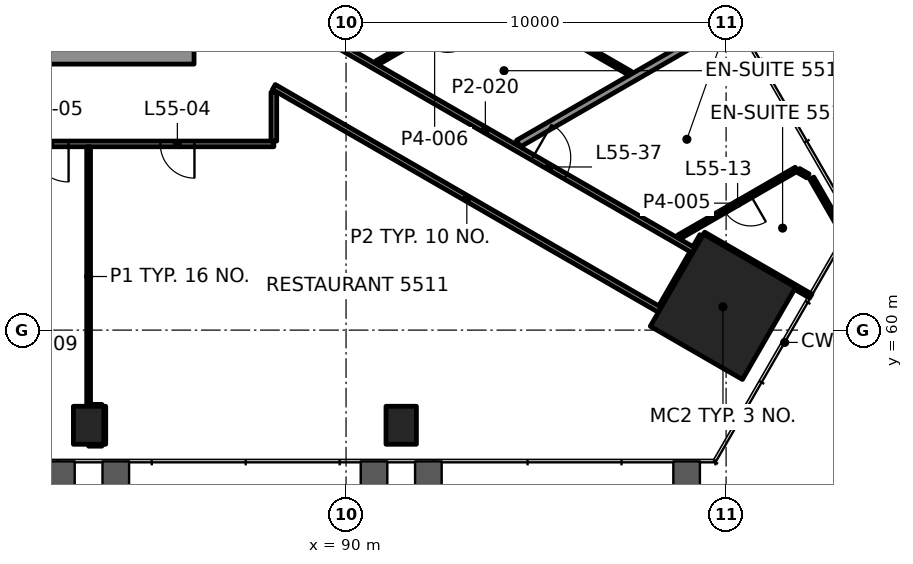
"""IFC4 building model, lengths in metres.
Left out: names, types, materials, properties, quantities, classifications, styles, units other than length and angle.
Written with IfcOpenShell. Run it as: python <this file> out.ifc"""

import sys

from ifc_helpers import new_model, si_unit, direction, frame, frame_2d, origin, origin_2d, place, context, subcontext, project, spatial, rectangle, hollow_rectangle, extrude, element, fill, save


model = new_model("IFC4")
c1 = context("Model", 3, precision=1e-05, world=origin(), true_north=direction((0.0, 1.0)))
c2 = subcontext(c1, "Body", "Model", "MODEL_VIEW")
j1 = project(units=[si_unit("LENGTHUNIT", "METRE"), si_unit("PLANEANGLEUNIT", "RADIAN")], contexts=[c1])
p1 = place(None, origin())
s1 = spatial("IfcSite", under=j1, at=p1, CompositionType="ELEMENT")
p2 = place(p1, origin())
s2 = spatial("IfcBuilding", under=s1, at=p2, CompositionType="ELEMENT")
p3 = place(p2, frame((0.0, 0.0, 233.8)))
s3 = spatial("IfcBuildingStorey", under=s2, at=p3, CompositionType="ELEMENT", Elevation=233.8)
p4 = place(p3, frame((99.918, 60.614, 0.0), z_axis=(0.0, 0.0, 1.0), x_axis=(0.5, 0.866025403784, 0.0)))
e1 = element("IfcColumn", 1, at=p4, inside=s3, PredefinedType="COLUMN", context=c2, shape_type="SweptSolid", body=[
    extrude(rectangle(XDim=2.8, YDim=2.8, at=origin_2d()), origin(), (0.0, 0.0, 1.0), 3.9),
])
for number, where, z_axis, x_axis in (
    (2, (83.226, 57.496, -0.0), (0.0, 0.0, 1.0), (1.0, 0.0, 0.0)),
    (3, (91.451, 57.496, -0.0), (0.0, 0.0, 1.0), (1.0, 0.0, 0.0)),
):
    element("IfcColumn", number, at=place(p3, frame(where, z_axis=z_axis, x_axis=x_axis)), inside=s3, PredefinedType="COLUMN", context=c2, shape_type="SweptSolid", body=[
        extrude(hollow_rectangle(XDim=0.8, YDim=1.0, WallThickness=0.05, at=origin_2d()), origin(), (0.0, 0.0, 1.0), 3.9),
    ])
p5 = place(p3, frame((64.0, 67.375, 0.0), z_axis=(0.0, 0.0, 1.0), x_axis=(1.0, 0.0, 0.0)))
e4 = element("IfcWall", 4, at=p5, inside=s3, PredefinedType="SHEAR", context=c2, shape_type="SweptSolid", body=[
    extrude(rectangle(XDim=22.0, YDim=0.75, at=frame_2d((11.0, 0.0))), origin(), (0.0, 0.0, 1.0), 3.7),
])
p6 = place(p5, frame((1.575, 0.0, 0.0)))
e5 = element("IfcOpeningElement", 5, at=p6, cuts=e4, PredefinedType="OPENING", context=c2, shape_type="SweptSolid", body=[
    extrude(rectangle(XDim=0.9, YDim=2.1, at=frame_2d((0.45, 1.05))), frame((0.0, 0.385, 0.0), z_axis=(0.0, -1.0, 0.0), x_axis=(1.0, 0.0, 0.0)), (0.0, 0.0, 1.0), 0.77),
])
p7 = place(p5, frame((4.425, 0.0, 0.0)))
e6 = element("IfcOpeningElement", 6, at=p7, cuts=e4, PredefinedType="OPENING", context=c2, shape_type="SweptSolid", body=[
    extrude(rectangle(XDim=0.9, YDim=2.1, at=frame_2d((0.45, 1.05))), frame((0.0, 0.385, 0.0), z_axis=(0.0, -1.0, 0.0), x_axis=(1.0, 0.0, 0.0)), (0.0, 0.0, 1.0), 0.77),
])
p8 = place(p3, frame((83.226, 56.996, 0.0), z_axis=(0.0, 0.0, 1.0), x_axis=(1.0, 0.0, 0.0)))
e7 = element("IfcWall", 7, at=p8, inside=s3, PredefinedType="PARTITIONING", context=c2, shape_type="SweptSolid", body=[
    extrude(rectangle(XDim=0.349, YDim=0.1, at=frame_2d((0.175, 0.0))), origin(), (0.0, 0.0, 1.0), 3.1),
])
p9 = place(p3, frame((83.286, 57.996, 0.0), z_axis=(0.0, 0.0, 1.0), x_axis=(1.0, 0.0, 0.0)))
e8 = element("IfcWall", 8, at=p9, inside=s3, PredefinedType="PARTITIONING", context=c2, shape_type="SweptSolid", body=[
    extrude(rectangle(XDim=0.289, YDim=0.1, at=frame_2d((0.145, 0.0))), origin(), (0.0, 0.0, 1.0), 3.1),
])
p10 = place(p3, frame((88.099, 64.9, 0.0), z_axis=(0.0, 0.0, 1.0), x_axis=(-1.0, 0.0, 0.0)))
e9 = element("IfcWall", 9, at=p10, inside=s3, PredefinedType="PARTITIONING", context=c2, shape_type="SweptSolid", body=[
    extrude(rectangle(XDim=26.199, YDim=0.15, at=frame_2d((13.1, 0.0))), origin(), (0.0, 0.0, 1.0), 3.1),
])
p11 = place(p10, frame((2.088, 0.0, 0.0)))
e10 = element("IfcOpeningElement", 10, at=p11, cuts=e9, PredefinedType="OPENING", context=c2, shape_type="SweptSolid", body=[
    extrude(rectangle(XDim=0.9, YDim=2.1, at=frame_2d((0.45, 1.05))), frame((0.0, 0.085, 0.0), z_axis=(0.0, -1.0, 0.0), x_axis=(1.0, 0.0, 0.0)), (0.0, 0.0, 1.0), 0.17),
])
p12 = place(p10, frame((5.4, 0.0, 0.0)))
e11 = element("IfcOpeningElement", 11, at=p12, cuts=e9, PredefinedType="OPENING", context=c2, shape_type="SweptSolid", body=[
    extrude(rectangle(XDim=1.0, YDim=2.1, at=frame_2d((0.5, 1.05))), frame((0.0, 0.085, 0.0), z_axis=(0.0, -1.0, 0.0), x_axis=(1.0, 0.0, 0.0)), (0.0, 0.0, 1.0), 0.17),
])
p13 = place(p10, frame((17.946, 0.0, 0.0)))
e12 = element("IfcOpeningElement", 12, at=p13, cuts=e9, PredefinedType="OPENING", context=c2, shape_type="SweptSolid", body=[
    extrude(rectangle(XDim=1.0, YDim=2.1, at=frame_2d((0.5, 1.05))), frame((0.0, 0.085, 0.0), z_axis=(0.0, -1.0, 0.0), x_axis=(1.0, 0.0, 0.0)), (0.0, 0.0, 1.0), 0.17),
])
p14 = place(p10, frame((24.395, 0.0, 0.0)))
e13 = element("IfcOpeningElement", 13, at=p14, cuts=e9, PredefinedType="OPENING", context=c2, shape_type="SweptSolid", body=[
    extrude(rectangle(XDim=1.0, YDim=2.1, at=frame_2d((0.5, 1.05))), frame((0.0, 0.085, 0.0), z_axis=(0.0, -1.0, 0.0), x_axis=(1.0, 0.0, 0.0)), (0.0, 0.0, 1.0), 0.17),
])
p15 = place(p3, frame((101.848, 64.234, 0.0), z_axis=(0.0, 0.0, 1.0), x_axis=(-0.865998731726, -0.500046194516, 0.0)))
e14 = element("IfcWall", 14, at=p15, inside=s3, PredefinedType="PARTITIONING", context=c2, shape_type="SweptSolid", body=[
    extrude(rectangle(XDim=3.569, YDim=0.12, at=frame_2d((1.784, 0.0))), origin(), (0.0, 0.0, 1.0), 3.1),
])
p16 = place(p15, frame((1.384, 0.0, 0.0)))
e15 = element("IfcOpeningElement", 15, at=p16, cuts=e14, PredefinedType="OPENING", context=c2, shape_type="SweptSolid", body=[
    extrude(rectangle(XDim=0.8, YDim=2.1, at=frame_2d((0.4, 1.05))), frame((0.0, 0.07, 0.0), z_axis=(0.0, -1.0, 0.0), x_axis=(1.0, 0.0, 0.0)), (0.0, 0.0, 1.0), 0.14),
])
p17 = place(p3, frame((94.535, 64.907, 0.0), z_axis=(0.0, 0.0, 1.0), x_axis=(0.866024015056, 0.50000240534, 0.0)))
e16 = element("IfcWall", 16, at=p17, inside=s3, PredefinedType="PARTITIONING", context=c2, shape_type="SweptSolid", body=[
    extrude(rectangle(XDim=6.593, YDim=0.2, at=frame_2d((3.296, 0.0))), origin(), (0.0, 0.0, 1.0), 3.1),
])
p18 = place(p3, frame((93.846, 68.784, 0.0), z_axis=(0.0, 0.0, 1.0), x_axis=(-0.865997352085, -0.500048583822, 0.0)))
e17 = element("IfcWall", 17, at=p18, inside=s3, PredefinedType="PARTITIONING", context=c2, shape_type="SweptSolid", body=[
    extrude(rectangle(XDim=3.499, YDim=0.12, at=frame_2d((1.75, 0.0))), origin(), (0.0, 0.0, 1.0), 3.1),
])
p19 = place(p18, frame((1.35, 0.0, 0.0)))
e18 = element("IfcOpeningElement", 18, at=p19, cuts=e17, PredefinedType="OPENING", context=c2, shape_type="SweptSolid", body=[
    extrude(rectangle(XDim=0.8, YDim=2.1, at=frame_2d((0.4, 1.05))), frame((0.0, 0.07, 0.0), z_axis=(0.0, -1.0, 0.0), x_axis=(1.0, 0.0, 0.0)), (0.0, 0.0, 1.0), 0.14),
])
p20 = place(p3, frame((98.293, 60.6, 0.0), z_axis=(0.0, 0.0, 1.0), x_axis=(0.499927431592, 0.866067297121, 0.0)))
e19 = element("IfcWall", 19, at=p20, inside=s3, PredefinedType="PARTITIONING", context=c2, shape_type="SweptSolid", body=[
    extrude(rectangle(XDim=1.65, YDim=0.15, at=frame_2d((0.825, 0.0))), origin(), (0.0, 0.0, 1.0), 2.947),
])
p21 = place(p3, frame((88.1, 64.976, 0.0), z_axis=(0.0, 0.0, 1.0), x_axis=(0.0, 1.0, 0.0)))
e20 = element("IfcWall", 20, at=p21, inside=s3, PredefinedType="PARTITIONING", context=c2, shape_type="SweptSolid", body=[
    extrude(rectangle(XDim=1.285, YDim=0.15, at=frame_2d((0.643, 0.0))), origin(), (0.0, 0.0, 1.0), 2.947),
])
p22 = place(p3, frame((83.626, 56.997, 0.0), z_axis=(0.0, 0.0, 1.0), x_axis=(0.0, 1.0, 0.0)))
e21 = element("IfcWall", 21, at=p22, inside=s3, PredefinedType="PARTITIONING", context=c2, shape_type="SweptSolid", body=[
    extrude(rectangle(XDim=0.999, YDim=0.1, at=frame_2d((0.5, 0.0))), origin(), (0.0, 0.0, 1.0), 3.022),
])
p23 = place(p3, frame((83.226, 57.996, 0.0), z_axis=(0.0, 0.0, 1.0), x_axis=(0.0, 1.0, 0.0)))
e22 = element("IfcWall", 22, at=p23, inside=s3, PredefinedType="PARTITIONING", context=c2, shape_type="SweptSolid", body=[
    extrude(rectangle(XDim=6.829, YDim=0.1, at=frame_2d((3.415, 0.0))), origin(), (0.0, 0.0, 1.0), 3.1),
])
p24 = place(p3, frame((103.138, 62.471, 0.0), z_axis=(0.0, 0.0, 1.0), x_axis=(-0.499998282143, 0.866026395587, 0.0)))
e23 = element("IfcWall", 23, at=p24, inside=s3, PredefinedType="PARTITIONING", context=c2, shape_type="SweptSolid", body=[
    extrude(rectangle(XDim=1.762, YDim=0.12, at=frame_2d((0.881, 0.0))), origin(), (0.0, 0.0, 1.0), 3.1),
])
p25 = place(p3, frame((102.153, 64.058, 0.0), z_axis=(0.0, 0.0, 1.0), x_axis=(-0.866113839764, 0.499846793097, 0.0)))
e24 = element("IfcWall", 24, at=p25, inside=s3, PredefinedType="PARTITIONING", context=c2, shape_type="SweptSolid", body=[
    extrude(rectangle(XDim=0.283, YDim=0.12, at=frame_2d((0.142, 0.0))), origin(), (0.0, 0.0, 1.0), 3.1),
])
p26 = place(p3, frame((97.473, 66.76, 0.0), z_axis=(0.0, 0.0, 1.0), x_axis=(-0.866027647951, 0.499996112969, 0.0)))
e25 = element("IfcWall", 25, at=p26, inside=s3, PredefinedType="PARTITIONING", context=c2, shape_type="SweptSolid", body=[
    extrude(rectangle(XDim=4.119, YDim=0.12, at=frame_2d((2.059, 0.0))), origin(), (0.0, 0.0, 1.0), 3.1),
])
p27 = place(p3, frame((102.229, 60.896, 0.0), z_axis=(0.0, 0.0, 1.0), x_axis=(-0.866054628924, 0.499949377157, 0.0)))
e26 = element("IfcWall", 26, at=p27, inside=s3, PredefinedType="PARTITIONING", context=c2, shape_type="SweptSolid", body=[
    extrude(rectangle(XDim=3.26, YDim=0.12, at=frame_2d((1.63, 0.0))), origin(), (0.0, 0.0, 1.0), 3.1),
])
p28 = place(p3, frame((88.175, 68.433, 0.0), z_axis=(0.0, 0.0, 1.0), x_axis=(0.866028141608, -0.499995257921, 0.0)))
e27 = element("IfcWall", 27, at=p28, inside=s3, PredefinedType="PARTITIONING", context=c2, shape_type="SweptSolid", body=[
    extrude(rectangle(XDim=12.679, YDim=0.15, at=frame_2d((6.339, 0.0))), origin(), (0.0, 0.0, 1.0), 3.1),
])
p29 = place(p28, frame((7.779, 0.0, 0.0)))
e28 = element("IfcOpeningElement", 28, at=p29, cuts=e27, PredefinedType="OPENING", context=c2, shape_type="SweptSolid", body=[
    extrude(rectangle(XDim=1.0, YDim=2.1, at=frame_2d((0.5, 1.05))), frame((0.0, 0.085, 0.0), z_axis=(0.0, -1.0, 0.0), x_axis=(1.0, 0.0, 0.0)), (0.0, 0.0, 1.0), 0.17),
])
p30 = place(p3, frame((98.255, 60.535, 0.0), z_axis=(0.0, 0.0, 1.0), x_axis=(-0.866028172479, 0.49999520445, 0.0)))
e29 = element("IfcWall", 29, at=p30, inside=s3, PredefinedType="PARTITIONING", context=c2, shape_type="SweptSolid", body=[
    extrude(rectangle(XDim=11.726, YDim=0.15, at=frame_2d((5.863, 0.0))), origin(), (0.0, 0.0, 1.0), 2.947),
])
p31 = place(p3, frame((99.192, 62.158, 0.0), z_axis=(0.0, 0.0, 1.0), x_axis=(0.500534336868, 0.865716684381, 0.0)))
e30 = element("IfcWall", 30, at=p31, inside=s3, PredefinedType="PARTITIONING", context=c2, shape_type="SweptSolid", body=[
    extrude(rectangle(XDim=0.364, YDim=0.15, at=frame_2d((0.182, 0.0))), origin(), (0.0, 0.0, 1.0), 3.1),
])
p32 = place(p11, origin())
e31 = element("IfcDoor", 31, at=p32, inside=s3, OperationType="SINGLE_SWING_LEFT", PredefinedType="DOOR", context=c2, shape_type="SweptSolid", body=[
    extrude(rectangle(XDim=0.9, YDim=2.1, at=frame_2d((0.45, 1.05))), frame((0.0, 0.025, 0.0), z_axis=(0.0, -1.0, 0.0), x_axis=(1.0, 0.0, 0.0)), (0.0, 0.0, 1.0), 0.05),
])
fill(e10, e31)
p33 = place(p12, origin())
e32 = element("IfcDoor", 32, at=p33, inside=s3, OperationType="SINGLE_SWING_LEFT", PredefinedType="DOOR", context=c2, shape_type="SweptSolid", body=[
    extrude(rectangle(XDim=1.0, YDim=2.1, at=frame_2d((0.5, 1.05))), frame((0.0, 0.025, 0.0), z_axis=(0.0, -1.0, 0.0), x_axis=(1.0, 0.0, 0.0)), (0.0, 0.0, 1.0), 0.05),
])
fill(e11, e32)
p34 = place(p16, origin())
e33 = element("IfcDoor", 33, at=p34, inside=s3, OperationType="SINGLE_SWING_LEFT", PredefinedType="DOOR", context=c2, shape_type="SweptSolid", body=[
    extrude(rectangle(XDim=0.8, YDim=2.1, at=frame_2d((0.4, 1.05))), frame((0.0, 0.025, 0.0), z_axis=(0.0, -1.0, 0.0), x_axis=(1.0, 0.0, 0.0)), (0.0, 0.0, 1.0), 0.05),
])
fill(e15, e33)
p35 = place(p29, origin())
e34 = element("IfcDoor", 34, at=p35, inside=s3, OperationType="SINGLE_SWING_RIGHT", PredefinedType="DOOR", context=c2, shape_type="SweptSolid", body=[
    extrude(rectangle(XDim=1.0, YDim=2.1, at=frame_2d((0.5, 1.05))), frame((0.0, 0.025, 0.0), z_axis=(0.0, -1.0, 0.0), x_axis=(1.0, 0.0, 0.0)), (0.0, 0.0, 1.0), 0.05),
])
fill(e28, e34)
p36 = place(p3, origin())
p37 = place(p36, frame((86.027, 56.521, 0.15), z_axis=(0.0, 0.0, 1.0), x_axis=(1.0, 0.0, 0.0)))
p38 = place(p37, origin())
e35 = element("IfcWindow", 35, at=p38, inside=s3, PartitioningType="SINGLE_PANEL", PredefinedType="WINDOW", context=c2, shape_type="SweptSolid", body=[
    extrude(rectangle(XDim=2.667, YDim=3.55, at=frame_2d((1.333, 1.775))), frame((0.0, 0.03, 0.0), z_axis=(0.0, -1.0, 0.0), x_axis=(1.0, 0.0, 0.0)), (0.0, 0.0, 1.0), 0.06),
])
p39 = place(p36, frame((101.97, 65.245, 0.15), z_axis=(0.0, 0.0, 1.0), x_axis=(-0.5, 0.866025, 0.0)))
p40 = place(p39, origin())
e36 = element("IfcWindow", 36, at=p40, inside=s3, PartitioningType="SINGLE_PANEL", PredefinedType="WINDOW", context=c2, shape_type="SweptSolid", body=[
    extrude(rectangle(XDim=2.667, YDim=3.55, at=frame_2d((1.333, 1.775))), frame((0.0, 0.03, 0.0), z_axis=(0.0, -1.0, 0.0), x_axis=(1.0, 0.0, 0.0)), (0.0, 0.0, 1.0), 0.06),
])
save(model, sys.argv[1])
